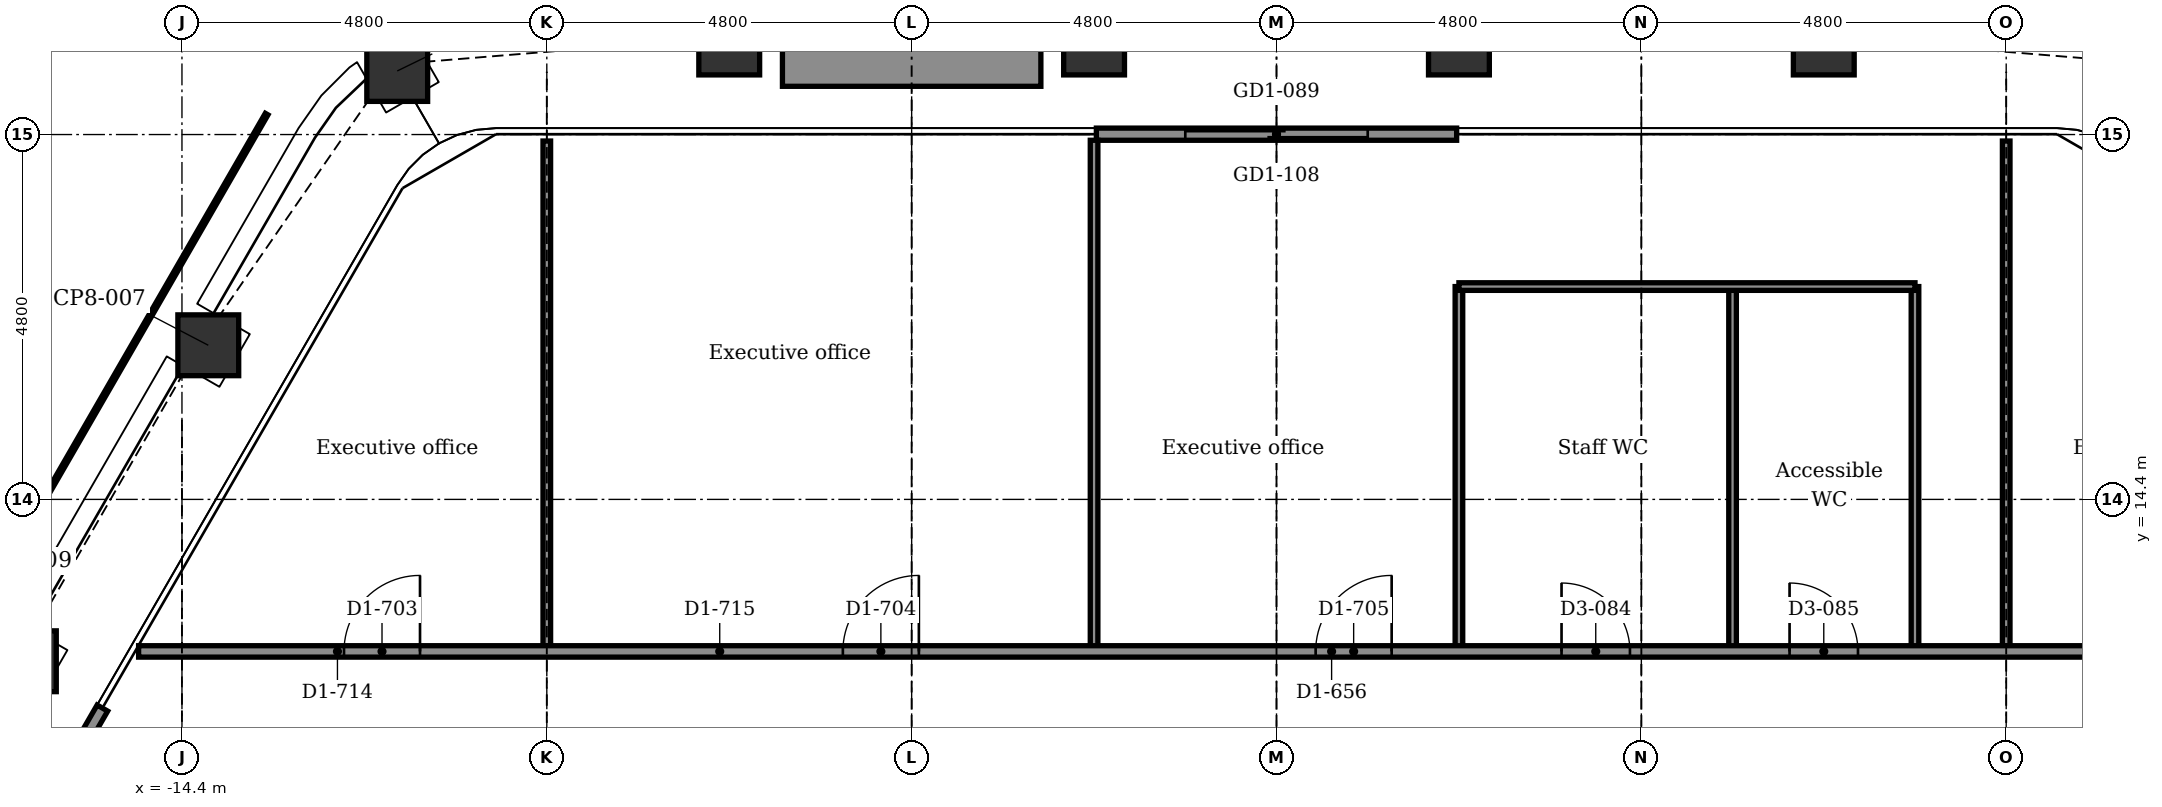
"""IFC4 building model, lengths in metres.
Left out: names, types, materials, properties, quantities, classifications, styles, units other than length and angle.
Written with IfcOpenShell. Run it as: python <this file> out.ifc"""

import sys

from ifc_helpers import new_model, si_unit, direction, frame, frame_2d, origin, origin_2d, place, context, subcontext, project, spatial, rectangle, extrude, element, fill, save


model = new_model("IFC4")
c1 = context("Model", 3, precision=1e-05, world=origin(), true_north=direction((0.0, 1.0)))
c2 = subcontext(c1, "Body", "Model", "MODEL_VIEW")
j1 = project(units=[si_unit("LENGTHUNIT", "METRE"), si_unit("PLANEANGLEUNIT", "RADIAN")], contexts=[c1])
p1 = place(None, origin())
s1 = spatial("IfcSite", under=j1, at=p1, CompositionType="ELEMENT")
p2 = place(p1, origin())
s2 = spatial("IfcBuilding", under=s1, at=p2, CompositionType="ELEMENT")
p3 = place(p2, frame((0.0, 0.0, 257.9)))
s3 = spatial("IfcBuildingStorey", under=s2, at=p3, CompositionType="ELEMENT", Elevation=257.9)
for number, where, z_axis, x_axis in (
    (1, (-11.568, 20.036, -0.15), (0.0, 0.0, 1.0), (0.866, 0.5, 0.0)),
    (2, (-7.2, 20.385, -0.15), (0.0, 0.0, 1.0), (1.0, 0.0, 0.0)),
    (3, (-2.4, 20.385, -0.15), (0.0, 0.0, 1.0), (1.0, 0.0, 0.0)),
    (4, (2.4, 20.385, -0.15), (0.0, 0.0, 1.0), (1.0, 0.0, 0.0)),
    (5, (7.2, 20.385, -0.15), (0.0, 0.0, 1.0), (1.0, 0.0, 0.0)),
    (6, (-16.454, 12.271, -0.15), (0.0, 0.0, 1.0), (0.5, 0.866, 0.0)),
    (7, (-14.054, 16.428, -0.15), (0.0, 0.0, 1.0), (0.5, 0.866, 0.0)),
):
    element("IfcColumn", number, at=place(p3, frame(where, z_axis=z_axis, x_axis=x_axis)), inside=s3, PredefinedType="COLUMN", context=c2, shape_type="SweptSolid", body=[
        extrude(rectangle(XDim=0.8, YDim=0.8, at=origin_2d()), origin(), (0.0, 0.0, 1.0), 3.9),
    ])
p4 = place(p3, frame((-2.37, 19.205, 0.0), z_axis=(0.0, 0.0, 1.0), x_axis=(1.0, 0.0, 0.0)))
e8 = element("IfcWall", 8, at=p4, inside=s3, PredefinedType="PARTITIONING", context=c2, shape_type="SweptSolid", body=[
    extrude(rectangle(XDim=4.74, YDim=0.16, at=frame_2d((2.37, 0.0))), origin(), (0.0, 0.0, 1.0), 3.75),
])
p5 = place(p4, frame((1.17, 0.0, 0.0)))
e9 = element("IfcOpeningElement", 9, at=p5, cuts=e8, PredefinedType="OPENING", context=c2, shape_type="SweptSolid", body=[
    extrude(rectangle(XDim=2.4, YDim=2.4, at=frame_2d((1.2, 1.2))), frame((0.0, 0.09, 0.0), z_axis=(0.0, -1.0, 0.0), x_axis=(1.0, 0.0, 0.0)), (0.0, 0.0, 1.0), 0.18),
])
p6 = place(p3, frame((-17.817, 7.55, 0.0), z_axis=(0.0, 0.0, 1.0), x_axis=(0.499978080042, 0.866038058908, 0.0)))
e10 = element("IfcWall", 10, at=p6, inside=s3, PredefinedType="PARTITIONING", context=c2, shape_type="SweptSolid", body=[
    extrude(rectangle(XDim=4.74, YDim=0.16, at=frame_2d((2.37, 0.0))), origin(), (0.0, 0.0, 1.0), 3.75),
])
p7 = place(p6, frame((1.17, 0.0, 0.0)))
e11 = element("IfcOpeningElement", 11, at=p7, cuts=e10, PredefinedType="OPENING", context=c2, shape_type="SweptSolid", body=[
    extrude(rectangle(XDim=2.4, YDim=2.4, at=frame_2d((1.2, 1.2))), frame((0.0, 0.09, 0.0), z_axis=(0.0, -1.0, 0.0), x_axis=(1.0, 0.0, 0.0)), (0.0, 0.0, 1.0), 0.18),
])
p8 = place(p3, frame((-6.5, 20.135, 0.0), z_axis=(0.0, 0.0, 1.0), x_axis=(1.0, 0.0, 0.0)))
e12 = element("IfcWall", 12, at=p8, inside=s3, PredefinedType="USERDEFINED", context=c2, shape_type="SweptSolid", body=[
    extrude(rectangle(XDim=3.4, YDim=0.6, at=frame_2d((1.7, 0.0))), origin(), (0.0, 0.0, 1.0), 0.7),
])
p9 = place(p3, frame((9.6, 12.4, 0.0), z_axis=(0.0, 0.0, 1.0), x_axis=(0.0, 1.0, 0.0)))
e13 = element("IfcWall", 13, at=p9, inside=s3, PredefinedType="PARTITIONING", context=c2, shape_type="SweptSolid", body=[
    extrude(rectangle(XDim=6.715, YDim=0.1, at=frame_2d((3.357, 0.0))), origin(), (0.0, 0.0, 1.0), 3.217),
])
for number, where, z_axis, x_axis in (
    (14, (8.4, 12.4, 0.0), (0.0, 0.0, 1.0), (0.0, 1.0, 0.0)),
    (15, (6.0, 12.4, 0.0), (0.0, 0.0, 1.0), (0.0, 1.0, 0.0)),
    (16, (2.4, 12.4, 0.0), (0.0, 0.0, 1.0), (0.0, 1.0, 0.0)),
):
    element("IfcWall", number, at=place(p3, frame(where, z_axis=z_axis, x_axis=x_axis)), inside=s3, PredefinedType="PARTITIONING", context=c2, shape_type="SweptSolid", body=[
        extrude(rectangle(XDim=4.8, YDim=0.1, at=frame_2d((2.4, 0.0))), origin(), (0.0, 0.0, 1.0), 3.75),
    ])
p10 = place(p3, frame((-2.4, 12.4, 0.0), z_axis=(0.0, 0.0, 1.0), x_axis=(0.0, 1.0, 0.0)))
e17 = element("IfcWall", 17, at=p10, inside=s3, PredefinedType="PARTITIONING", context=c2, shape_type="SweptSolid", body=[
    extrude(rectangle(XDim=6.725, YDim=0.1, at=frame_2d((3.362, 0.0))), origin(), (0.0, 0.0, 1.0), 3.75),
])
p11 = place(p3, frame((-9.6, 12.4, 0.0), z_axis=(0.0, 0.0, 1.0), x_axis=(0.0, 1.0, 0.0)))
e18 = element("IfcWall", 18, at=p11, inside=s3, PredefinedType="PARTITIONING", context=c2, shape_type="SweptSolid", body=[
    extrude(rectangle(XDim=6.715, YDim=0.1, at=frame_2d((3.357, 0.0))), origin(), (0.0, 0.0, 1.0), 3.293),
])
p12 = place(p3, frame((-14.97, 12.4, 0.0), z_axis=(0.0, 0.0, 1.0), x_axis=(1.0, 0.0, 0.0)))
e19 = element("IfcWall", 19, at=p12, inside=s3, PredefinedType="PARTITIONING", context=c2, shape_type="SweptSolid", body=[
    extrude(rectangle(XDim=29.94, YDim=0.15, at=frame_2d((14.97, 0.0))), origin(), (0.0, 0.0, 1.0), 3.75),
])
p13 = place(p12, frame((18.72, 0.0, 0.0)))
e20 = element("IfcOpeningElement", 20, at=p13, cuts=e19, PredefinedType="OPENING", context=c2, shape_type="SweptSolid", body=[
    extrude(rectangle(XDim=0.9, YDim=2.1, at=frame_2d((0.45, 1.05))), frame((0.0, 0.085, 0.0), z_axis=(0.0, -1.0, 0.0), x_axis=(1.0, 0.0, 0.0)), (0.0, 0.0, 1.0), 0.17),
])
p14 = place(p12, frame((21.72, 0.0, 0.0)))
e21 = element("IfcOpeningElement", 21, at=p14, cuts=e19, PredefinedType="OPENING", context=c2, shape_type="SweptSolid", body=[
    extrude(rectangle(XDim=0.9, YDim=2.1, at=frame_2d((0.45, 1.05))), frame((0.0, 0.085, 0.0), z_axis=(0.0, -1.0, 0.0), x_axis=(1.0, 0.0, 0.0)), (0.0, 0.0, 1.0), 0.17),
])
p15 = place(p12, frame((2.702, 0.0, 0.0)))
e22 = element("IfcOpeningElement", 22, at=p15, cuts=e19, PredefinedType="OPENING", context=c2, shape_type="SweptSolid", body=[
    extrude(rectangle(XDim=1.0, YDim=2.1, at=frame_2d((0.5, 1.05))), frame((0.0, 0.085, 0.0), z_axis=(0.0, -1.0, 0.0), x_axis=(1.0, 0.0, 0.0)), (0.0, 0.0, 1.0), 0.17),
])
p16 = place(p12, frame((9.265, 0.0, 0.0)))
e23 = element("IfcOpeningElement", 23, at=p16, cuts=e19, PredefinedType="OPENING", context=c2, shape_type="SweptSolid", body=[
    extrude(rectangle(XDim=1.0, YDim=2.1, at=frame_2d((0.5, 1.05))), frame((0.0, 0.085, 0.0), z_axis=(0.0, -1.0, 0.0), x_axis=(1.0, 0.0, 0.0)), (0.0, 0.0, 1.0), 0.17),
])
p17 = place(p12, frame((15.485, 0.0, 0.0)))
e24 = element("IfcOpeningElement", 24, at=p17, cuts=e19, PredefinedType="OPENING", context=c2, shape_type="SweptSolid", body=[
    extrude(rectangle(XDim=1.0, YDim=2.1, at=frame_2d((0.5, 1.05))), frame((0.0, 0.085, 0.0), z_axis=(0.0, -1.0, 0.0), x_axis=(1.0, 0.0, 0.0)), (0.0, 0.0, 1.0), 0.17),
])
p18 = place(p12, frame((26.238, 0.0, 0.0)))
e25 = element("IfcOpeningElement", 25, at=p18, cuts=e19, PredefinedType="OPENING", context=c2, shape_type="SweptSolid", body=[
    extrude(rectangle(XDim=1.0, YDim=2.1, at=frame_2d((0.5, 1.05))), frame((0.0, 0.085, 0.0), z_axis=(0.0, -1.0, 0.0), x_axis=(1.0, 0.0, 0.0)), (0.0, 0.0, 1.0), 0.17),
])
p19 = place(p3, frame((2.4, 17.2, 0.0), z_axis=(0.0, 0.0, 1.0), x_axis=(1.0, 0.0, 0.0)))
e26 = element("IfcWall", 26, at=p19, inside=s3, PredefinedType="PARTITIONING", context=c2, shape_type="SweptSolid", body=[
    extrude(rectangle(XDim=6.0, YDim=0.1, at=frame_2d((3.0, 0.0))), origin(), (0.0, 0.0, 1.0), 3.75),
])
p20 = place(p5, origin())
e27 = element("IfcDoor", 27, at=p20, inside=s3, OperationType="DOUBLE_DOOR_SLIDING", PredefinedType="DOOR", context=c2, shape_type="SweptSolid", body=[
    extrude(rectangle(XDim=2.4, YDim=2.4, at=frame_2d((1.2, 1.2))), frame((0.0, 0.025, 0.0), z_axis=(0.0, -1.0, 0.0), x_axis=(1.0, 0.0, 0.0)), (0.0, 0.0, 1.0), 0.05),
])
fill(e9, e27)
p21 = place(p13, origin())
e28 = element("IfcDoor", 28, at=p21, inside=s3, OperationType="SINGLE_SWING_LEFT", PredefinedType="DOOR", context=c2, shape_type="SweptSolid", body=[
    extrude(rectangle(XDim=0.9, YDim=2.1, at=frame_2d((0.45, 1.05))), frame((0.0, 0.025, 0.0), z_axis=(0.0, -1.0, 0.0), x_axis=(1.0, 0.0, 0.0)), (0.0, 0.0, 1.0), 0.05),
])
fill(e20, e28)
p22 = place(p14, origin())
e29 = element("IfcDoor", 29, at=p22, inside=s3, OperationType="SINGLE_SWING_LEFT", PredefinedType="DOOR", context=c2, shape_type="SweptSolid", body=[
    extrude(rectangle(XDim=0.9, YDim=2.1, at=frame_2d((0.45, 1.05))), frame((0.0, 0.025, 0.0), z_axis=(0.0, -1.0, 0.0), x_axis=(1.0, 0.0, 0.0)), (0.0, 0.0, 1.0), 0.05),
])
fill(e21, e29)
p23 = place(p15, origin())
e30 = element("IfcDoor", 30, at=p23, inside=s3, OperationType="SINGLE_SWING_RIGHT", PredefinedType="DOOR", context=c2, shape_type="SweptSolid", body=[
    extrude(rectangle(XDim=1.0, YDim=2.1, at=frame_2d((0.5, 1.05))), frame((0.0, 0.025, 0.0), z_axis=(0.0, -1.0, 0.0), x_axis=(1.0, 0.0, 0.0)), (0.0, 0.0, 1.0), 0.05),
])
fill(e22, e30)
p24 = place(p16, origin())
e31 = element("IfcDoor", 31, at=p24, inside=s3, OperationType="SINGLE_SWING_RIGHT", PredefinedType="DOOR", context=c2, shape_type="SweptSolid", body=[
    extrude(rectangle(XDim=1.0, YDim=2.1, at=frame_2d((0.5, 1.05))), frame((0.0, 0.025, 0.0), z_axis=(0.0, -1.0, 0.0), x_axis=(1.0, 0.0, 0.0)), (0.0, 0.0, 1.0), 0.05),
])
fill(e23, e31)
p25 = place(p17, origin())
e32 = element("IfcDoor", 32, at=p25, inside=s3, OperationType="SINGLE_SWING_RIGHT", PredefinedType="DOOR", context=c2, shape_type="SweptSolid", body=[
    extrude(rectangle(XDim=1.0, YDim=2.1, at=frame_2d((0.5, 1.05))), frame((0.0, 0.025, 0.0), z_axis=(0.0, -1.0, 0.0), x_axis=(1.0, 0.0, 0.0)), (0.0, 0.0, 1.0), 0.05),
])
fill(e24, e32)
save(model, sys.argv[1])
